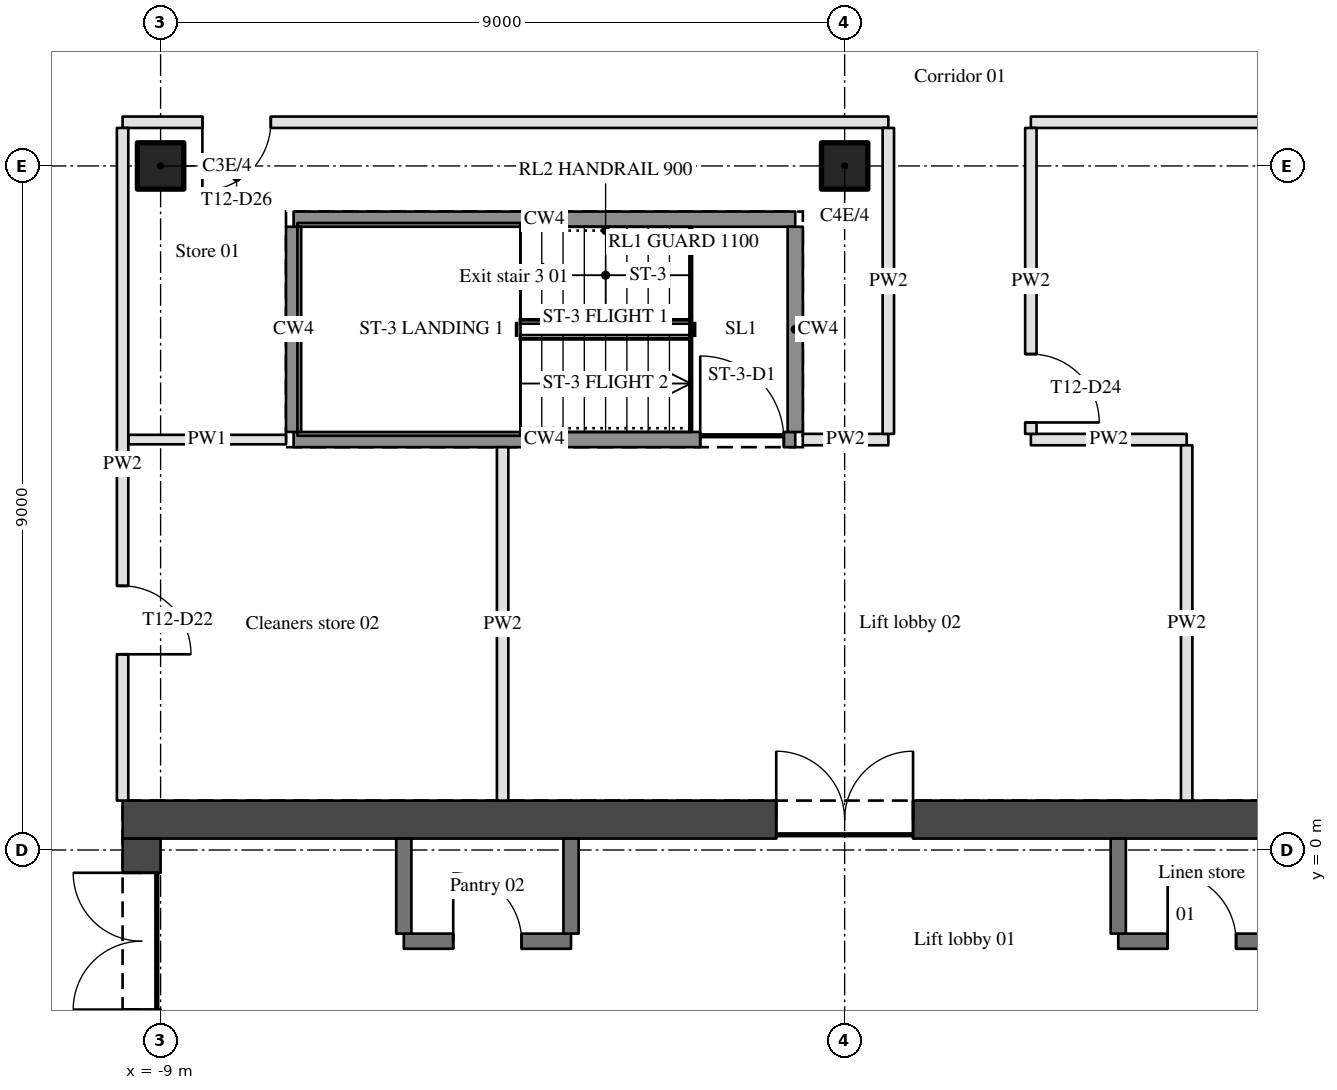
"""IFC4 building model, lengths in metres.
Left out: names, types, materials, properties, quantities, classifications, styles, units other than length and angle.
Written with IfcOpenShell. Run it as: python <this file> out.ifc"""

import sys

from ifc_helpers import new_model, si_unit, direction, frame, frame_2d, origin, origin_2d, place, context, subcontext, project, spatial, rectangle, hollow_circle, extrude, element, fill, save


model = new_model("IFC4")
c1 = context("Model", 3, precision=1e-05, world=origin(), true_north=direction((0.0, 1.0)))
c2 = subcontext(c1, "Body", "Model", "MODEL_VIEW")
j1 = project(units=[si_unit("LENGTHUNIT", "METRE"), si_unit("PLANEANGLEUNIT", "RADIAN")], contexts=[c1])
p1 = place(None, origin())
s1 = spatial("IfcSite", under=j1, at=p1, CompositionType="ELEMENT")
p2 = place(p1, origin())
s2 = spatial("IfcBuilding", under=s1, at=p2, CompositionType="ELEMENT")
p3 = place(p2, frame((0.0, 0.0, 172.2)))
s3 = spatial("IfcBuildingStorey", under=s2, at=p3, CompositionType="ELEMENT", Elevation=172.2)
for number, where, z_axis, x_axis in (
    (1, (-9.0, 9.0, 0.0), (0.0, 0.0, 1.0), (1.0, 0.0, 0.0)),
    (2, (0.0, 9.0, 0.0), (0.0, 0.0, 1.0), (1.0, 0.0, 0.0)),
):
    element("IfcColumn", number, at=place(p3, frame(where, z_axis=z_axis, x_axis=x_axis)), inside=s3, PredefinedType="COLUMN", context=c2, shape_type="SweptSolid", body=[
        extrude(hollow_circle(Radius=0.305, WallThickness=0.03, at=origin_2d()), origin(), (0.0, 0.0, 1.0), 3.15),
    ])
p4 = place(p3, frame((-9.5, 0.4, 0.0), z_axis=(0.0, 0.0, 1.0), x_axis=(1.0, 0.0, 0.0)))
e3 = element("IfcWall", 3, at=p4, inside=s3, PredefinedType="SHEAR", context=c2, shape_type="SweptSolid", body=[
    extrude(rectangle(XDim=19.0, YDim=0.5, at=frame_2d((9.5, 0.0))), origin(), (0.0, 0.0, 1.0), 3.15),
])
p5 = place(p4, frame((8.6, 0.0, 0.0)))
e4 = element("IfcOpeningElement", 4, at=p5, cuts=e3, PredefinedType="OPENING", context=c2, shape_type="SweptSolid", body=[
    extrude(rectangle(XDim=1.8, YDim=2.1, at=frame_2d((0.9, 1.05))), frame((0.0, 0.26, 0.0), z_axis=(0.0, -1.0, 0.0), x_axis=(1.0, 0.0, 0.0)), (0.0, 0.0, 1.0), 0.52),
])
p6 = place(p3, frame((-9.25, -11.5, 0.0), z_axis=(0.0, 0.0, 1.0), x_axis=(0.0, 1.0, 0.0)))
e5 = element("IfcWall", 5, at=p6, inside=s3, PredefinedType="SHEAR", context=c2, shape_type="SweptSolid", body=[
    extrude(rectangle(XDim=11.65, YDim=0.5, at=frame_2d((5.825, 0.0))), origin(), (0.0, 0.0, 1.0), 3.15),
])
p7 = place(p6, frame((9.4, 0.0, 0.0)))
e6 = element("IfcOpeningElement", 6, at=p7, cuts=e5, PredefinedType="OPENING", context=c2, shape_type="SweptSolid", body=[
    extrude(rectangle(XDim=1.8, YDim=2.1, at=frame_2d((0.9, 1.05))), frame((0.0, 0.26, 0.0), z_axis=(0.0, -1.0, 0.0), x_axis=(1.0, 0.0, 0.0)), (0.0, 0.0, 1.0), 0.52),
])
p8 = place(p3, frame((-5.8, -1.2, 0.0), z_axis=(0.0, 0.0, 1.0), x_axis=(1.0, 0.0, 0.0)))
e7 = element("IfcWall", 7, at=p8, inside=s3, PredefinedType="SOLIDWALL", context=c2, shape_type="SweptSolid", body=[
    extrude(rectangle(XDim=2.2, YDim=0.2, at=frame_2d((1.1, 0.0))), origin(), (0.0, 0.0, 1.0), 2.85),
])
p9 = place(p8, frame((0.65, 0.0, 0.0)))
e8 = element("IfcOpeningElement", 8, at=p9, cuts=e7, PredefinedType="OPENING", context=c2, shape_type="SweptSolid", body=[
    extrude(rectangle(XDim=0.9, YDim=2.1, at=frame_2d((0.45, 1.05))), frame((0.0, 0.11, 0.0), z_axis=(0.0, -1.0, 0.0), x_axis=(1.0, 0.0, 0.0)), (0.0, 0.0, 1.0), 0.22),
])
p10 = place(p3, frame((3.6, -1.2, 0.0), z_axis=(0.0, 0.0, 1.0), x_axis=(1.0, 0.0, 0.0)))
e9 = element("IfcWall", 9, at=p10, inside=s3, PredefinedType="SOLIDWALL", context=c2, shape_type="SweptSolid", body=[
    extrude(rectangle(XDim=2.2, YDim=0.2, at=frame_2d((1.1, 0.0))), origin(), (0.0, 0.0, 1.0), 2.85),
])
p11 = place(p10, frame((0.65, 0.0, 0.0)))
e10 = element("IfcOpeningElement", 10, at=p11, cuts=e9, PredefinedType="OPENING", context=c2, shape_type="SweptSolid", body=[
    extrude(rectangle(XDim=0.9, YDim=2.1, at=frame_2d((0.45, 1.05))), frame((0.0, 0.11, 0.0), z_axis=(0.0, -1.0, 0.0), x_axis=(1.0, 0.0, 0.0)), (0.0, 0.0, 1.0), 0.22),
])
p12 = place(p3, frame((-9.425, 5.4, 0.0), z_axis=(0.0, 0.0, 1.0), x_axis=(1.0, 0.0, 0.0)))
e11 = element("IfcWall", 11, at=p12, inside=s3, PredefinedType="PARTITIONING", context=c2, shape_type="SweptSolid", body=[
    extrude(rectangle(XDim=2.075, YDim=0.125, at=frame_2d((1.038, 0.0))), origin(), (0.0, 0.0, 1.0), 2.21),
])
p13 = place(p3, frame((-7.25, 5.4, 0.0), z_axis=(0.0, 0.0, 1.0), x_axis=(1.0, 0.0, 0.0)))
e12 = element("IfcWall", 12, at=p13, inside=s3, PredefinedType="SHEAR", context=c2, shape_type="SweptSolid", body=[
    extrude(rectangle(XDim=6.6, YDim=0.2, at=frame_2d((3.3, 0.0))), origin(), (0.0, 0.0, 1.0), 3.15),
])
p14 = place(p13, frame((5.35, 0.0, 0.0)))
e13 = element("IfcOpeningElement", 13, at=p14, cuts=e12, PredefinedType="OPENING", context=c2, shape_type="SweptSolid", body=[
    extrude(rectangle(XDim=1.1, YDim=2.1, at=frame_2d((0.55, 1.05))), frame((0.0, 0.11, 0.0), z_axis=(0.0, -1.0, 0.0), x_axis=(1.0, 0.0, 0.0)), (0.0, 0.0, 1.0), 0.22),
])
p15 = place(p3, frame((-0.55, 5.4, 0.0), z_axis=(0.0, 0.0, 1.0), x_axis=(1.0, 0.0, 0.0)))
e14 = element("IfcWall", 14, at=p15, inside=s3, PredefinedType="PARTITIONING", context=c2, shape_type="SweptSolid", body=[
    extrude(rectangle(XDim=1.125, YDim=0.15, at=frame_2d((0.562, 0.0))), origin(), (0.0, 0.0, 1.0), 2.21),
])
p16 = place(p3, frame((2.45, 5.4, 0.0), z_axis=(0.0, 0.0, 1.0), x_axis=(1.0, 0.0, 0.0)))
e15 = element("IfcWall", 15, at=p16, inside=s3, PredefinedType="PARTITIONING", context=c2, shape_type="SweptSolid", body=[
    extrude(rectangle(XDim=2.05, YDim=0.15, at=frame_2d((1.025, 0.0))), origin(), (0.0, 0.0, 1.0), 2.21),
])
p17 = place(p3, frame((-7.25, 8.3, 0.0), z_axis=(0.0, 0.0, 1.0), x_axis=(1.0, 0.0, 0.0)))
e16 = element("IfcWall", 16, at=p17, inside=s3, PredefinedType="SHEAR", context=c2, shape_type="SweptSolid", body=[
    extrude(rectangle(XDim=6.6, YDim=0.2, at=frame_2d((3.3, 0.0))), origin(), (0.0, 0.0, 1.0), 3.15),
])
p18 = place(p3, frame((0.575, 9.575, 0.0), z_axis=(0.0, 0.0, 1.0), x_axis=(-1.0, 0.0, 0.0)))
e17 = element("IfcWall", 17, at=p18, inside=s3, PredefinedType="PARTITIONING", context=c2, shape_type="SweptSolid", body=[
    extrude(rectangle(XDim=10.075, YDim=0.15, at=frame_2d((5.038, 0.0))), origin(), (0.0, 0.0, 1.0), 2.21),
])
p19 = place(p18, frame((8.125, 0.0, 0.0)))
e18 = element("IfcOpeningElement", 18, at=p19, cuts=e17, PredefinedType="OPENING", context=c2, shape_type="SweptSolid", body=[
    extrude(rectangle(XDim=0.9, YDim=2.1, at=frame_2d((0.45, 1.05))), frame((0.0, 0.085, 0.0), z_axis=(0.0, -1.0, 0.0), x_axis=(1.0, 0.0, 0.0)), (0.0, 0.0, 1.0), 0.17),
])
p20 = place(p3, frame((2.45, 9.575, 0.0), z_axis=(0.0, 0.0, 1.0), x_axis=(1.0, 0.0, 0.0)))
e19 = element("IfcWall", 19, at=p20, inside=s3, PredefinedType="PARTITIONING", context=c2, shape_type="SweptSolid", body=[
    extrude(rectangle(XDim=7.05, YDim=0.15, at=frame_2d((3.525, 0.0))), origin(), (0.0, 0.0, 1.0), 2.21),
])
p21 = place(p3, frame((-9.5, 9.5, 0.0), z_axis=(0.0, 0.0, 1.0), x_axis=(0.0, -1.0, 0.0)))
e20 = element("IfcWall", 20, at=p21, inside=s3, PredefinedType="PARTITIONING", context=c2, shape_type="SweptSolid", body=[
    extrude(rectangle(XDim=8.85, YDim=0.15, at=frame_2d((4.425, 0.0))), origin(), (0.0, 0.0, 1.0), 2.21),
])
p22 = place(p21, frame((6.025, 0.0, 0.0)))
e21 = element("IfcOpeningElement", 21, at=p22, cuts=e20, PredefinedType="OPENING", context=c2, shape_type="SweptSolid", body=[
    extrude(rectangle(XDim=0.9, YDim=2.1, at=frame_2d((0.45, 1.05))), frame((0.0, 0.085, 0.0), z_axis=(0.0, -1.0, 0.0), x_axis=(1.0, 0.0, 0.0)), (0.0, 0.0, 1.0), 0.17),
])
p23 = place(p3, frame((-7.25, 5.5, 0.0), z_axis=(0.0, 0.0, 1.0), x_axis=(0.0, 1.0, 0.0)))
e22 = element("IfcWall", 22, at=p23, inside=s3, PredefinedType="SHEAR", context=c2, shape_type="SweptSolid", body=[
    extrude(rectangle(XDim=2.7, YDim=0.2, at=frame_2d((1.35, 0.0))), origin(), (0.0, 0.0, 1.0), 3.15),
])
p24 = place(p3, frame((-5.8, -1.1, 0.0), z_axis=(0.0, 0.0, 1.0), x_axis=(0.0, 1.0, 0.0)))
e23 = element("IfcWall", 23, at=p24, inside=s3, PredefinedType="SOLIDWALL", context=c2, shape_type="SweptSolid", body=[
    extrude(rectangle(XDim=1.25, YDim=0.2, at=frame_2d((0.625, 0.0))), origin(), (0.0, 0.0, 1.0), 2.85),
])
p25 = place(p3, frame((-4.5, 0.65, 0.0), z_axis=(0.0, 0.0, 1.0), x_axis=(0.0, 1.0, 0.0)))
e24 = element("IfcWall", 24, at=p25, inside=s3, PredefinedType="PARTITIONING", context=c2, shape_type="SweptSolid", body=[
    extrude(rectangle(XDim=4.65, YDim=0.15, at=frame_2d((2.325, 0.0))), origin(), (0.0, 0.0, 1.0), 2.21),
])
p26 = place(p3, frame((-3.6, -1.1, 0.0), z_axis=(0.0, 0.0, 1.0), x_axis=(0.0, 1.0, 0.0)))
e25 = element("IfcWall", 25, at=p26, inside=s3, PredefinedType="SOLIDWALL", context=c2, shape_type="SweptSolid", body=[
    extrude(rectangle(XDim=1.25, YDim=0.2, at=frame_2d((0.625, 0.0))), origin(), (0.0, 0.0, 1.0), 2.85),
])
p27 = place(p3, frame((-0.65, 5.5, 0.0), z_axis=(0.0, 0.0, 1.0), x_axis=(0.0, 1.0, 0.0)))
e26 = element("IfcWall", 26, at=p27, inside=s3, PredefinedType="SHEAR", context=c2, shape_type="SweptSolid", body=[
    extrude(rectangle(XDim=2.7, YDim=0.2, at=frame_2d((1.35, 0.0))), origin(), (0.0, 0.0, 1.0), 3.15),
])
p28 = place(p3, frame((0.575, 5.475, 0.0), z_axis=(0.0, 0.0, 1.0), x_axis=(0.0, 1.0, 0.0)))
e27 = element("IfcWall", 27, at=p28, inside=s3, PredefinedType="PARTITIONING", context=c2, shape_type="SweptSolid", body=[
    extrude(rectangle(XDim=4.025, YDim=0.15, at=frame_2d((2.012, 0.0))), origin(), (0.0, 0.0, 1.0), 2.21),
])
p29 = place(p3, frame((2.45, 9.5, 0.0), z_axis=(0.0, 0.0, 1.0), x_axis=(0.0, -1.0, 0.0)))
e28 = element("IfcWall", 28, at=p29, inside=s3, PredefinedType="PARTITIONING", context=c2, shape_type="SweptSolid", body=[
    extrude(rectangle(XDim=4.025, YDim=0.15, at=frame_2d((2.012, 0.0))), origin(), (0.0, 0.0, 1.0), 2.21),
])
p30 = place(p29, frame((2.975, 0.0, 0.0)))
e29 = element("IfcOpeningElement", 29, at=p30, cuts=e28, PredefinedType="OPENING", context=c2, shape_type="SweptSolid", body=[
    extrude(rectangle(XDim=0.9, YDim=2.1, at=frame_2d((0.45, 1.05))), frame((0.0, 0.085, 0.0), z_axis=(0.0, -1.0, 0.0), x_axis=(1.0, 0.0, 0.0)), (0.0, 0.0, 1.0), 0.17),
])
p31 = place(p3, frame((3.6, -1.1, 0.0), z_axis=(0.0, 0.0, 1.0), x_axis=(0.0, 1.0, 0.0)))
e30 = element("IfcWall", 30, at=p31, inside=s3, PredefinedType="SOLIDWALL", context=c2, shape_type="SweptSolid", body=[
    extrude(rectangle(XDim=1.25, YDim=0.2, at=frame_2d((0.625, 0.0))), origin(), (0.0, 0.0, 1.0), 2.85),
])
p32 = place(p3, frame((4.5, 0.65, 0.0), z_axis=(0.0, 0.0, 1.0), x_axis=(0.0, 1.0, 0.0)))
e31 = element("IfcWall", 31, at=p32, inside=s3, PredefinedType="PARTITIONING", context=c2, shape_type="SweptSolid", body=[
    extrude(rectangle(XDim=4.675, YDim=0.15, at=frame_2d((2.337, 0.0))), origin(), (0.0, 0.0, 1.0), 2.21),
])
p33 = place(p7, origin())
e32 = element("IfcDoor", 32, at=p33, inside=s3, OperationType="DOUBLE_DOOR_SINGLE_SWING", PredefinedType="DOOR", context=c2, shape_type="SweptSolid", body=[
    extrude(rectangle(XDim=1.8, YDim=2.1, at=frame_2d((0.9, 1.05))), frame((0.0, 0.025, 0.0), z_axis=(0.0, -1.0, 0.0), x_axis=(1.0, 0.0, 0.0)), (0.0, 0.0, 1.0), 0.05),
])
fill(e6, e32)
p34 = place(p5, origin())
e33 = element("IfcDoor", 33, at=p34, inside=s3, OperationType="DOUBLE_DOOR_SINGLE_SWING", PredefinedType="DOOR", context=c2, shape_type="SweptSolid", body=[
    extrude(rectangle(XDim=1.8, YDim=2.1, at=frame_2d((0.9, 1.05))), frame((0.0, 0.025, 0.0), z_axis=(0.0, -1.0, 0.0), x_axis=(1.0, 0.0, 0.0)), (0.0, 0.0, 1.0), 0.05),
])
fill(e4, e33)
p35 = place(p14, origin())
e34 = element("IfcDoor", 34, at=p35, inside=s3, OperationType="SINGLE_SWING_LEFT", PredefinedType="DOOR", context=c2, shape_type="SweptSolid", body=[
    extrude(rectangle(XDim=1.1, YDim=2.1, at=frame_2d((0.55, 1.05))), frame((0.0, 0.025, 0.0), z_axis=(0.0, -1.0, 0.0), x_axis=(1.0, 0.0, 0.0)), (0.0, 0.0, 1.0), 0.05),
])
fill(e13, e34)
p36 = place(p30, origin())
e35 = element("IfcDoor", 35, at=p36, inside=s3, OperationType="SINGLE_SWING_RIGHT", PredefinedType="DOOR", context=c2, shape_type="SweptSolid", body=[
    extrude(rectangle(XDim=0.9, YDim=2.1, at=frame_2d((0.45, 1.05))), frame((0.0, 0.025, 0.0), z_axis=(0.0, -1.0, 0.0), x_axis=(1.0, 0.0, 0.0)), (0.0, 0.0, 1.0), 0.05),
])
fill(e29, e35)
p37 = place(p19, origin())
e36 = element("IfcDoor", 36, at=p37, inside=s3, OperationType="SINGLE_SWING_RIGHT", PredefinedType="DOOR", context=c2, shape_type="SweptSolid", body=[
    extrude(rectangle(XDim=0.9, YDim=2.1, at=frame_2d((0.45, 1.05))), frame((0.0, 0.025, 0.0), z_axis=(0.0, -1.0, 0.0), x_axis=(1.0, 0.0, 0.0)), (0.0, 0.0, 1.0), 0.05),
])
fill(e18, e36)
p38 = place(p22, origin())
e37 = element("IfcDoor", 37, at=p38, inside=s3, OperationType="SINGLE_SWING_RIGHT", PredefinedType="DOOR", context=c2, shape_type="SweptSolid", body=[
    extrude(rectangle(XDim=0.9, YDim=2.1, at=frame_2d((0.45, 1.05))), frame((0.0, 0.025, 0.0), z_axis=(0.0, -1.0, 0.0), x_axis=(1.0, 0.0, 0.0)), (0.0, 0.0, 1.0), 0.05),
])
fill(e21, e37)
p39 = place(p9, origin())
e38 = element("IfcDoor", 38, at=p39, inside=s3, OperationType="SINGLE_SWING_LEFT", PredefinedType="DOOR", context=c2, shape_type="SweptSolid", body=[
    extrude(rectangle(XDim=0.9, YDim=2.1, at=frame_2d((0.45, 1.05))), frame((0.0, 0.025, 0.0), z_axis=(0.0, -1.0, 0.0), x_axis=(1.0, 0.0, 0.0)), (0.0, 0.0, 1.0), 0.05),
])
fill(e8, e38)
p40 = place(p11, origin())
e39 = element("IfcDoor", 39, at=p40, inside=s3, OperationType="SINGLE_SWING_LEFT", PredefinedType="DOOR", context=c2, shape_type="SweptSolid", body=[
    extrude(rectangle(XDim=0.9, YDim=2.1, at=frame_2d((0.45, 1.05))), frame((0.0, 0.025, 0.0), z_axis=(0.0, -1.0, 0.0), x_axis=(1.0, 0.0, 0.0)), (0.0, 0.0, 1.0), 0.05),
])
fill(e10, e39)
save(model, sys.argv[1])
